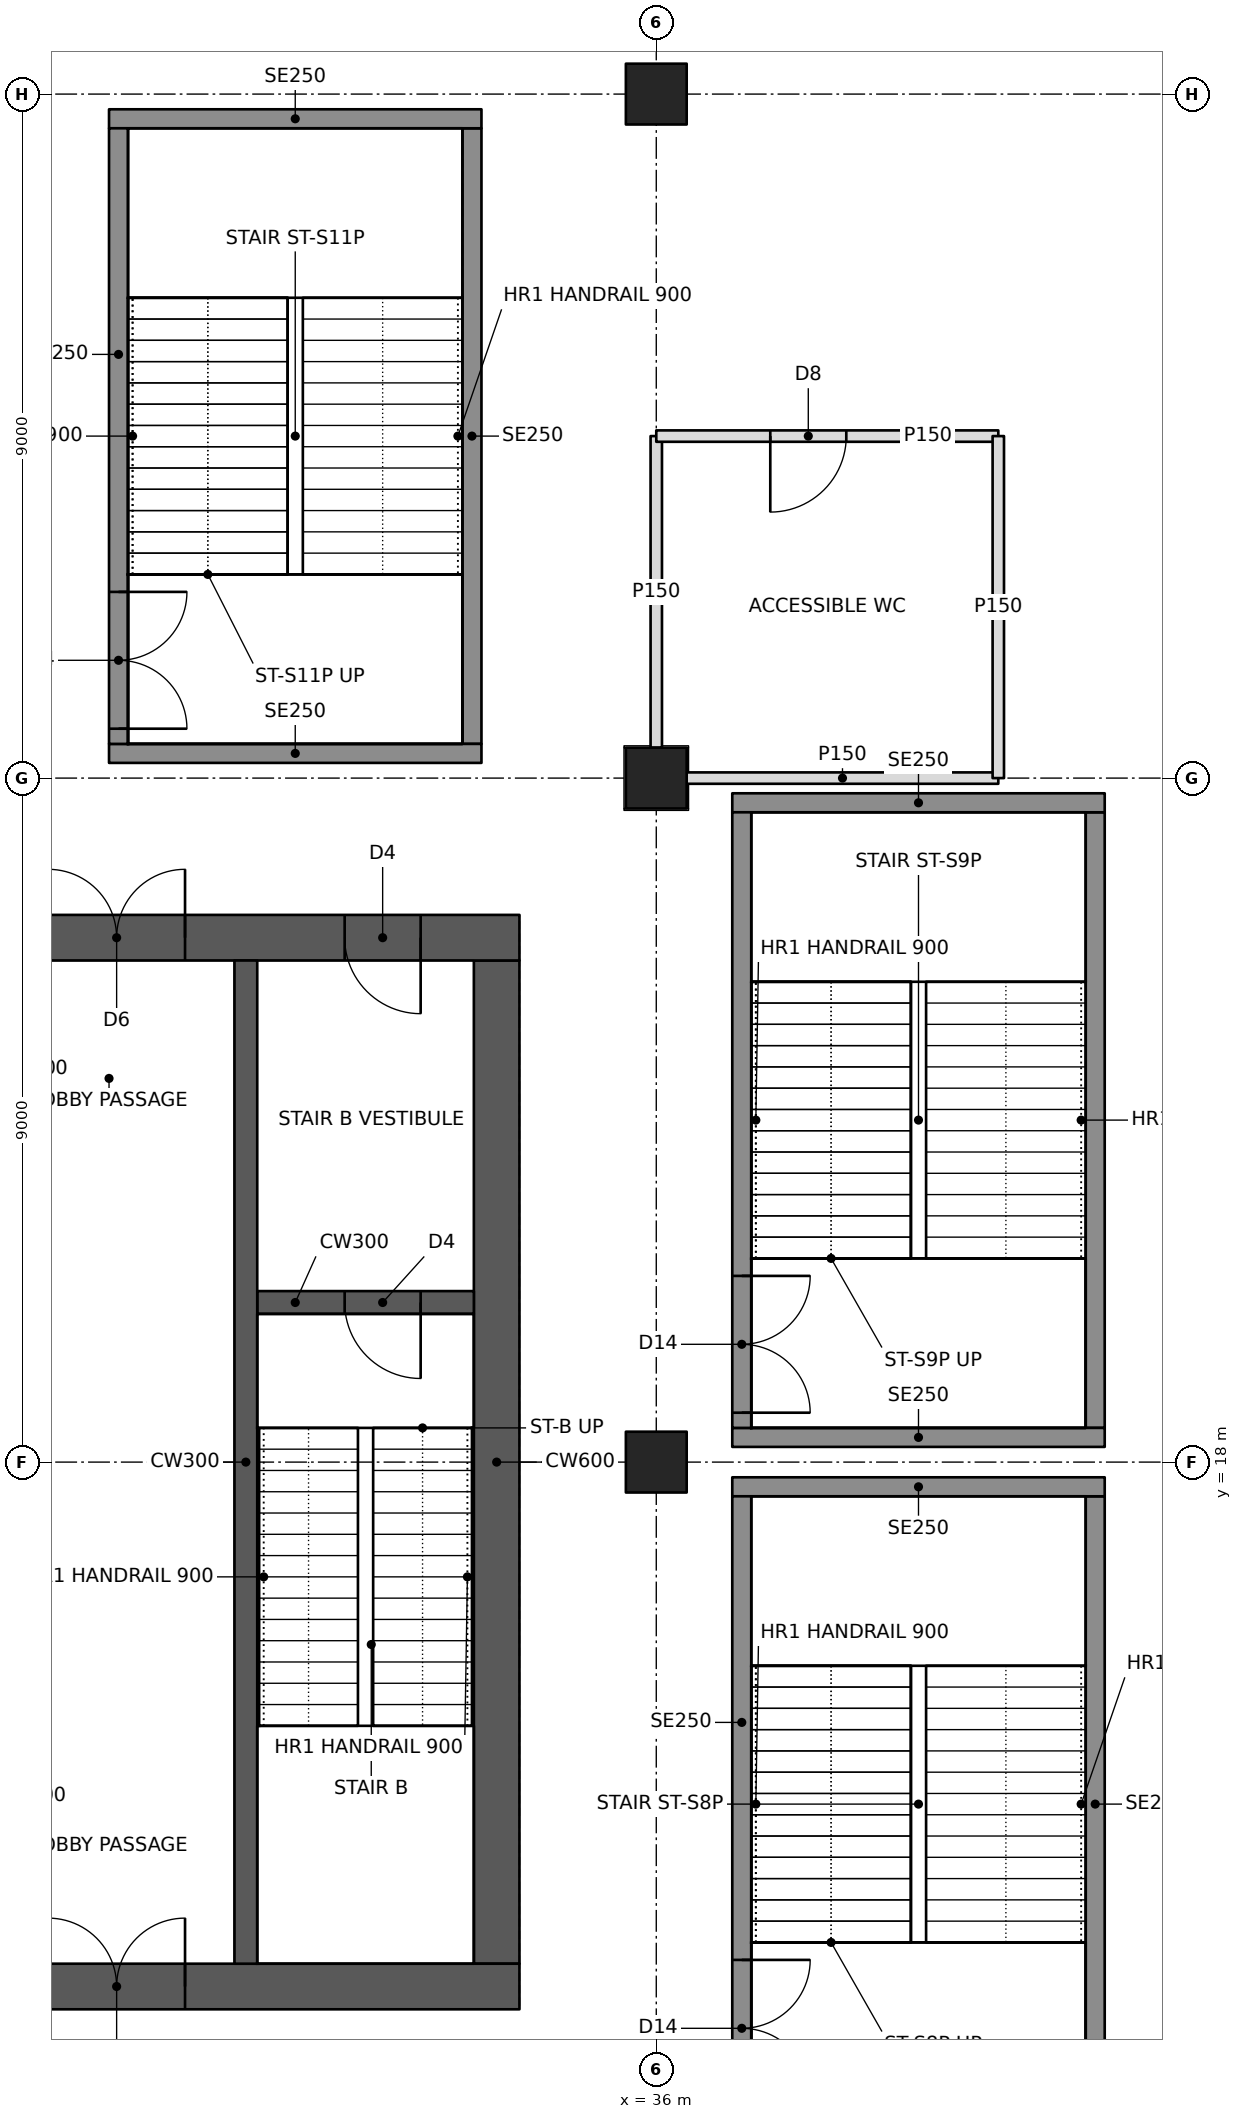
"""IFC4 building model, lengths in metres.
Left out: names, types, materials, properties, quantities, classifications, styles, units other than length and angle.
Written with IfcOpenShell. Run it as: python <this file> out.ifc"""

import sys

from ifc_helpers import new_model, si_unit, direction, frame, frame_2d, origin, origin_2d, place, context, subcontext, project, spatial, rectangle, hollow_rectangle, extrude, element, fill, save


model = new_model("IFC4")
c1 = context("Model", 3, precision=1e-05, world=origin(), true_north=direction((0.0, 1.0)))
c2 = subcontext(c1, "Body", "Model", "MODEL_VIEW")
j1 = project(units=[si_unit("LENGTHUNIT", "METRE"), si_unit("PLANEANGLEUNIT", "RADIAN")], contexts=[c1])
p1 = place(None, origin())
s1 = spatial("IfcSite", under=j1, at=p1, CompositionType="ELEMENT")
p2 = place(p1, origin())
s2 = spatial("IfcBuilding", under=s1, at=p2, CompositionType="ELEMENT")
p3 = place(p2, frame((0.0, 0.0, 11.0)))
s3 = spatial("IfcBuildingStorey", under=s2, at=p3, CompositionType="ELEMENT", Elevation=11.0)
for number, where, z_axis, x_axis in (
    (1, (36.0, 18.0, 0.0), (0.0, 0.0, 1.0), (0.0, 1.0, 0.0)),
    (2, (36.0, 27.0, 0.0), (0.0, 0.0, 1.0), (1.0, 0.0, 0.0)),
    (3, (36.0, 36.0, 0.0), (0.0, 0.0, 1.0), (1.0, 0.0, 0.0)),
):
    element("IfcColumn", number, at=place(p3, frame(where, z_axis=z_axis, x_axis=x_axis)), inside=s3, PredefinedType="COLUMN", context=c2, shape_type="SweptSolid", body=[
        extrude(hollow_rectangle(XDim=0.8, YDim=0.8, WallThickness=0.1, at=origin_2d()), origin(), (0.0, 0.0, 1.0), 5.0),
    ])
p4 = place(p3, frame((10.8, 11.1, 0.0), z_axis=(0.0, 0.0, 1.0), x_axis=(1.0, 0.0, 0.0)))
e4 = element("IfcWall", 4, at=p4, inside=s3, PredefinedType="SHEAR", context=c2, shape_type="SweptSolid", body=[
    extrude(rectangle(XDim=23.4, YDim=0.6, at=frame_2d((11.7, 0.0))), origin(), (0.0, 0.0, 1.0), 5.0),
])
p5 = place(p4, frame((1.0, 0.0, 0.0)))
e5 = element("IfcOpeningElement", 5, at=p5, cuts=e4, PredefinedType="OPENING", context=c2, shape_type="SweptSolid", body=[
    extrude(rectangle(XDim=1.0, YDim=2.1, at=frame_2d((0.5, 1.05))), frame((0.0, 0.31, 0.0), z_axis=(0.0, -1.0, 0.0), x_axis=(1.0, 0.0, 0.0)), (0.0, 0.0, 1.0), 0.62),
])
p6 = place(p4, frame((17.2, 0.0, 0.0)))
e6 = element("IfcOpeningElement", 6, at=p6, cuts=e4, PredefinedType="OPENING", context=c2, shape_type="SweptSolid", body=[
    extrude(rectangle(XDim=1.8, YDim=2.1, at=frame_2d((0.9, 1.05))), frame((0.0, 0.31, 0.0), z_axis=(0.0, -1.0, 0.0), x_axis=(1.0, 0.0, 0.0)), (0.0, 0.0, 1.0), 0.62),
])
p7 = place(p3, frame((10.8, 24.9, 0.0), z_axis=(0.0, 0.0, 1.0), x_axis=(1.0, 0.0, 0.0)))
e7 = element("IfcWall", 7, at=p7, inside=s3, PredefinedType="SHEAR", context=c2, shape_type="SweptSolid", body=[
    extrude(rectangle(XDim=23.4, YDim=0.6, at=frame_2d((11.7, 0.0))), origin(), (0.0, 0.0, 1.0), 5.0),
])
p8 = place(p7, frame((17.2, 0.0, 0.0)))
e8 = element("IfcOpeningElement", 8, at=p8, cuts=e7, PredefinedType="OPENING", context=c2, shape_type="SweptSolid", body=[
    extrude(rectangle(XDim=1.8, YDim=2.1, at=frame_2d((0.9, 1.05))), frame((0.0, 0.31, 0.0), z_axis=(0.0, -1.0, 0.0), x_axis=(1.0, 0.0, 0.0)), (0.0, 0.0, 1.0), 0.62),
])
p9 = place(p7, frame((21.1, 0.0, 0.0)))
e9 = element("IfcOpeningElement", 9, at=p9, cuts=e7, PredefinedType="OPENING", context=c2, shape_type="SweptSolid", body=[
    extrude(rectangle(XDim=1.0, YDim=2.1, at=frame_2d((0.5, 1.05))), frame((0.0, 0.31, 0.0), z_axis=(0.0, -1.0, 0.0), x_axis=(1.0, 0.0, 0.0)), (0.0, 0.0, 1.0), 0.62),
])
p10 = place(p3, frame((33.9, 11.4, 0.0), z_axis=(0.0, 0.0, 1.0), x_axis=(0.0, 1.0, 0.0)))
e10 = element("IfcWall", 10, at=p10, inside=s3, PredefinedType="SHEAR", context=c2, shape_type="SweptSolid", body=[
    extrude(rectangle(XDim=13.2, YDim=0.6, at=frame_2d((6.6, 0.0))), origin(), (0.0, 0.0, 1.0), 5.0),
])
p11 = place(p3, frame((30.6, 11.4, 0.0), z_axis=(0.0, 0.0, 1.0), x_axis=(0.0, 1.0, 0.0)))
e11 = element("IfcWall", 11, at=p11, inside=s3, PredefinedType="SHEAR", context=c2, shape_type="SweptSolid", body=[
    extrude(rectangle(XDim=13.2, YDim=0.3, at=frame_2d((6.6, 0.0))), origin(), (0.0, 0.0, 1.0), 5.0),
])
p12 = place(p3, frame((30.75, 20.1, 0.0), z_axis=(0.0, 0.0, 1.0), x_axis=(1.0, 0.0, 0.0)))
e12 = element("IfcWall", 12, at=p12, inside=s3, PredefinedType="SHEAR", context=c2, shape_type="SweptSolid", body=[
    extrude(rectangle(XDim=2.85, YDim=0.3, at=frame_2d((1.425, 0.0))), origin(), (0.0, 0.0, 1.0), 5.0),
])
p13 = place(p12, frame((1.15, 0.0, 0.0)))
e13 = element("IfcOpeningElement", 13, at=p13, cuts=e12, PredefinedType="OPENING", context=c2, shape_type="SweptSolid", body=[
    extrude(rectangle(XDim=1.0, YDim=2.1, at=frame_2d((0.5, 1.05))), frame((0.0, 0.16, 0.0), z_axis=(0.0, -1.0, 0.0), x_axis=(1.0, 0.0, 0.0)), (0.0, 0.0, 1.0), 0.32),
])
for number, where, z_axis, x_axis in (
    (14, (36.0, 27.4, 0.0), (0.0, 0.0, 1.0), (0.0, 1.0, 0.0)),
    (15, (40.5, 27.0, 0.0), (0.0, 0.0, 1.0), (-1.0, 0.0, 0.0)),
):
    element("IfcWall", number, at=place(p3, frame(where, z_axis=z_axis, x_axis=x_axis)), inside=s3, PredefinedType="PARTITIONING", context=c2, shape_type="SweptSolid", body=[
        extrude(rectangle(XDim=4.1, YDim=0.15, at=frame_2d((2.05, 0.0))), origin(), (0.0, 0.0, 1.0), 3.892),
    ])
p14 = place(p3, frame((36.0, 31.5, 0.0), z_axis=(0.0, 0.0, 1.0), x_axis=(1.0, 0.0, 0.0)))
e16 = element("IfcWall", 16, at=p14, inside=s3, PredefinedType="PARTITIONING", context=c2, shape_type="SweptSolid", body=[
    extrude(rectangle(XDim=4.5, YDim=0.15, at=frame_2d((2.25, 0.0))), origin(), (0.0, 0.0, 1.0), 3.891),
])
p15 = place(p14, frame((1.5, 0.0, 0.0)))
e17 = element("IfcOpeningElement", 17, at=p15, cuts=e16, PredefinedType="OPENING", context=c2, shape_type="SweptSolid", body=[
    extrude(rectangle(XDim=1.0, YDim=2.1, at=frame_2d((0.5, 1.05))), frame((0.0, 0.085, 0.0), z_axis=(0.0, -1.0, 0.0), x_axis=(1.0, 0.0, 0.0)), (0.0, 0.0, 1.0), 0.17),
])
p16 = place(p3, frame((40.5, 31.5, 0.0), z_axis=(0.0, 0.0, 1.0), x_axis=(0.0, -1.0, 0.0)))
e18 = element("IfcWall", 18, at=p16, inside=s3, PredefinedType="PARTITIONING", context=c2, shape_type="SweptSolid", body=[
    extrude(rectangle(XDim=4.5, YDim=0.15, at=frame_2d((2.25, 0.0))), origin(), (0.0, 0.0, 1.0), 3.891),
])
p17 = place(p3, frame((37.0, 17.675, 0.0), z_axis=(0.0, 0.0, 1.0), x_axis=(1.0, 0.0, 0.0)))
e19 = element("IfcWall", 19, at=p17, inside=s3, PredefinedType="SOLIDWALL", context=c2, shape_type="SweptSolid", body=[
    extrude(rectangle(XDim=4.9, YDim=0.25, at=frame_2d((2.45, 0.0))), origin(), (0.0, 0.0, 1.0), 4.75),
])
p18 = place(p3, frame((37.125, 9.45, 0.0), z_axis=(0.0, 0.0, 1.0), x_axis=(0.0, 1.0, 0.0)))
e20 = element("IfcWall", 20, at=p18, inside=s3, PredefinedType="SOLIDWALL", context=c2, shape_type="SweptSolid", body=[
    extrude(rectangle(XDim=8.1, YDim=0.25, at=frame_2d((4.05, 0.0))), origin(), (0.0, 0.0, 1.0), 4.75),
])
p19 = place(p18, frame((0.2, 0.0, 0.0)))
e21 = element("IfcOpeningElement", 21, at=p19, cuts=e20, PredefinedType="OPENING", context=c2, shape_type="SweptSolid", body=[
    extrude(rectangle(XDim=1.8, YDim=2.1, at=frame_2d((0.9, 1.05))), frame((0.0, 0.135, 0.0), z_axis=(0.0, -1.0, 0.0), x_axis=(1.0, 0.0, 0.0)), (0.0, 0.0, 1.0), 0.27),
])
p20 = place(p3, frame((41.775, 9.45, 0.0), z_axis=(0.0, 0.0, 1.0), x_axis=(0.0, 1.0, 0.0)))
e22 = element("IfcWall", 22, at=p20, inside=s3, PredefinedType="SOLIDWALL", context=c2, shape_type="SweptSolid", body=[
    extrude(rectangle(XDim=8.1, YDim=0.25, at=frame_2d((4.05, 0.0))), origin(), (0.0, 0.0, 1.0), 4.75),
])
for number, where, z_axis, x_axis in (
    (23, (37.0, 18.325, 0.0), (0.0, 0.0, 1.0), (1.0, 0.0, 0.0)),
    (24, (37.0, 26.675, 0.0), (0.0, 0.0, 1.0), (1.0, 0.0, 0.0)),
):
    element("IfcWall", number, at=place(p3, frame(where, z_axis=z_axis, x_axis=x_axis)), inside=s3, PredefinedType="SOLIDWALL", context=c2, shape_type="SweptSolid", body=[
        extrude(rectangle(XDim=4.9, YDim=0.25, at=frame_2d((2.45, 0.0))), origin(), (0.0, 0.0, 1.0), 4.75),
    ])
p21 = place(p3, frame((37.125, 18.45, 0.0), z_axis=(0.0, 0.0, 1.0), x_axis=(0.0, 1.0, 0.0)))
e25 = element("IfcWall", 25, at=p21, inside=s3, PredefinedType="SOLIDWALL", context=c2, shape_type="SweptSolid", body=[
    extrude(rectangle(XDim=8.1, YDim=0.25, at=frame_2d((4.05, 0.0))), origin(), (0.0, 0.0, 1.0), 4.75),
])
p22 = place(p21, frame((0.2, 0.0, 0.0)))
e26 = element("IfcOpeningElement", 26, at=p22, cuts=e25, PredefinedType="OPENING", context=c2, shape_type="SweptSolid", body=[
    extrude(rectangle(XDim=1.8, YDim=2.1, at=frame_2d((0.9, 1.05))), frame((0.0, 0.135, 0.0), z_axis=(0.0, -1.0, 0.0), x_axis=(1.0, 0.0, 0.0)), (0.0, 0.0, 1.0), 0.27),
])
p23 = place(p3, frame((41.775, 18.45, 0.0), z_axis=(0.0, 0.0, 1.0), x_axis=(0.0, 1.0, 0.0)))
e27 = element("IfcWall", 27, at=p23, inside=s3, PredefinedType="SOLIDWALL", context=c2, shape_type="SweptSolid", body=[
    extrude(rectangle(XDim=8.1, YDim=0.25, at=frame_2d((4.05, 0.0))), origin(), (0.0, 0.0, 1.0), 4.75),
])
for number, where, z_axis, x_axis in (
    (28, (28.8, 27.325, 0.0), (0.0, 0.0, 1.0), (1.0, 0.0, 0.0)),
    (29, (28.8, 35.675, 0.0), (0.0, 0.0, 1.0), (1.0, 0.0, 0.0)),
):
    element("IfcWall", number, at=place(p3, frame(where, z_axis=z_axis, x_axis=x_axis)), inside=s3, PredefinedType="SOLIDWALL", context=c2, shape_type="SweptSolid", body=[
        extrude(rectangle(XDim=4.9, YDim=0.25, at=frame_2d((2.45, 0.0))), origin(), (0.0, 0.0, 1.0), 4.75),
    ])
p24 = place(p3, frame((28.925, 27.45, 0.0), z_axis=(0.0, 0.0, 1.0), x_axis=(0.0, 1.0, 0.0)))
e30 = element("IfcWall", 30, at=p24, inside=s3, PredefinedType="SOLIDWALL", context=c2, shape_type="SweptSolid", body=[
    extrude(rectangle(XDim=8.1, YDim=0.25, at=frame_2d((4.05, 0.0))), origin(), (0.0, 0.0, 1.0), 4.75),
])
p25 = place(p24, frame((0.2, 0.0, 0.0)))
e31 = element("IfcOpeningElement", 31, at=p25, cuts=e30, PredefinedType="OPENING", context=c2, shape_type="SweptSolid", body=[
    extrude(rectangle(XDim=1.8, YDim=2.1, at=frame_2d((0.9, 1.05))), frame((0.0, 0.135, 0.0), z_axis=(0.0, -1.0, 0.0), x_axis=(1.0, 0.0, 0.0)), (0.0, 0.0, 1.0), 0.27),
])
p26 = place(p3, frame((33.575, 27.45, 0.0), z_axis=(0.0, 0.0, 1.0), x_axis=(0.0, 1.0, 0.0)))
e32 = element("IfcWall", 32, at=p26, inside=s3, PredefinedType="SOLIDWALL", context=c2, shape_type="SweptSolid", body=[
    extrude(rectangle(XDim=8.1, YDim=0.25, at=frame_2d((4.05, 0.0))), origin(), (0.0, 0.0, 1.0), 4.75),
])
p27 = place(p15, frame((1.0, 0.0, 0.0), z_axis=(0.0, 0.0, 1.0), x_axis=(-1.0, 0.0, 0.0)))
e33 = element("IfcDoor", 33, at=p27, inside=s3, OperationType="SINGLE_SWING_RIGHT", PredefinedType="DOOR", context=c2, shape_type="SweptSolid", body=[
    extrude(rectangle(XDim=1.0, YDim=2.1, at=frame_2d((0.5, 1.05))), frame((0.0, 0.025, 0.0), z_axis=(0.0, -1.0, 0.0), x_axis=(1.0, 0.0, 0.0)), (0.0, 0.0, 1.0), 0.05),
])
fill(e17, e33)
p28 = place(p6, origin())
e34 = element("IfcDoor", 34, at=p28, inside=s3, OperationType="DOUBLE_DOOR_SINGLE_SWING", PredefinedType="DOOR", context=c2, shape_type="SweptSolid", body=[
    extrude(rectangle(XDim=1.8, YDim=2.1, at=frame_2d((0.9, 1.05))), frame((0.0, 0.025, 0.0), z_axis=(0.0, -1.0, 0.0), x_axis=(1.0, 0.0, 0.0)), (0.0, 0.0, 1.0), 0.05),
])
fill(e6, e34)
p29 = place(p8, origin())
e35 = element("IfcDoor", 35, at=p29, inside=s3, OperationType="DOUBLE_DOOR_SINGLE_SWING", PredefinedType="DOOR", context=c2, shape_type="SweptSolid", body=[
    extrude(rectangle(XDim=1.8, YDim=2.1, at=frame_2d((0.9, 1.05))), frame((0.0, 0.025, 0.0), z_axis=(0.0, -1.0, 0.0), x_axis=(1.0, 0.0, 0.0)), (0.0, 0.0, 1.0), 0.05),
])
fill(e8, e35)
p30 = place(p9, frame((1.0, 0.0, 0.0), z_axis=(0.0, 0.0, 1.0), x_axis=(-1.0, 0.0, 0.0)))
e36 = element("IfcDoor", 36, at=p30, inside=s3, OperationType="SINGLE_SWING_LEFT", PredefinedType="DOOR", context=c2, shape_type="SweptSolid", body=[
    extrude(rectangle(XDim=1.0, YDim=2.1, at=frame_2d((0.5, 1.05))), frame((0.0, 0.025, 0.0), z_axis=(0.0, -1.0, 0.0), x_axis=(1.0, 0.0, 0.0)), (0.0, 0.0, 1.0), 0.05),
])
fill(e9, e36)
p31 = place(p13, frame((1.0, 0.0, 0.0), z_axis=(0.0, 0.0, 1.0), x_axis=(-1.0, 0.0, 0.0)))
e37 = element("IfcDoor", 37, at=p31, inside=s3, OperationType="SINGLE_SWING_LEFT", PredefinedType="DOOR", context=c2, shape_type="SweptSolid", body=[
    extrude(rectangle(XDim=1.0, YDim=2.1, at=frame_2d((0.5, 1.05))), frame((0.0, 0.025, 0.0), z_axis=(0.0, -1.0, 0.0), x_axis=(1.0, 0.0, 0.0)), (0.0, 0.0, 1.0), 0.05),
])
fill(e13, e37)
p32 = place(p19, frame((1.8, 0.0, 0.0), z_axis=(0.0, 0.0, 1.0), x_axis=(-1.0, 0.0, 0.0)))
e38 = element("IfcDoor", 38, at=p32, inside=s3, OperationType="DOUBLE_DOOR_SINGLE_SWING", PredefinedType="DOOR", context=c2, shape_type="SweptSolid", body=[
    extrude(rectangle(XDim=1.8, YDim=2.1, at=frame_2d((0.9, 1.05))), frame((0.0, 0.025, 0.0), z_axis=(0.0, -1.0, 0.0), x_axis=(1.0, 0.0, 0.0)), (0.0, 0.0, 1.0), 0.05),
])
fill(e21, e38)
p33 = place(p22, frame((1.8, 0.0, 0.0), z_axis=(0.0, 0.0, 1.0), x_axis=(-1.0, 0.0, 0.0)))
e39 = element("IfcDoor", 39, at=p33, inside=s3, OperationType="DOUBLE_DOOR_SINGLE_SWING", PredefinedType="DOOR", context=c2, shape_type="SweptSolid", body=[
    extrude(rectangle(XDim=1.8, YDim=2.1, at=frame_2d((0.9, 1.05))), frame((0.0, 0.025, 0.0), z_axis=(0.0, -1.0, 0.0), x_axis=(1.0, 0.0, 0.0)), (0.0, 0.0, 1.0), 0.05),
])
fill(e26, e39)
p34 = place(p25, frame((1.8, 0.0, 0.0), z_axis=(0.0, 0.0, 1.0), x_axis=(-1.0, 0.0, 0.0)))
e40 = element("IfcDoor", 40, at=p34, inside=s3, OperationType="DOUBLE_DOOR_SINGLE_SWING", PredefinedType="DOOR", context=c2, shape_type="SweptSolid", body=[
    extrude(rectangle(XDim=1.8, YDim=2.1, at=frame_2d((0.9, 1.05))), frame((0.0, 0.025, 0.0), z_axis=(0.0, -1.0, 0.0), x_axis=(1.0, 0.0, 0.0)), (0.0, 0.0, 1.0), 0.05),
])
fill(e31, e40)
save(model, sys.argv[1])
